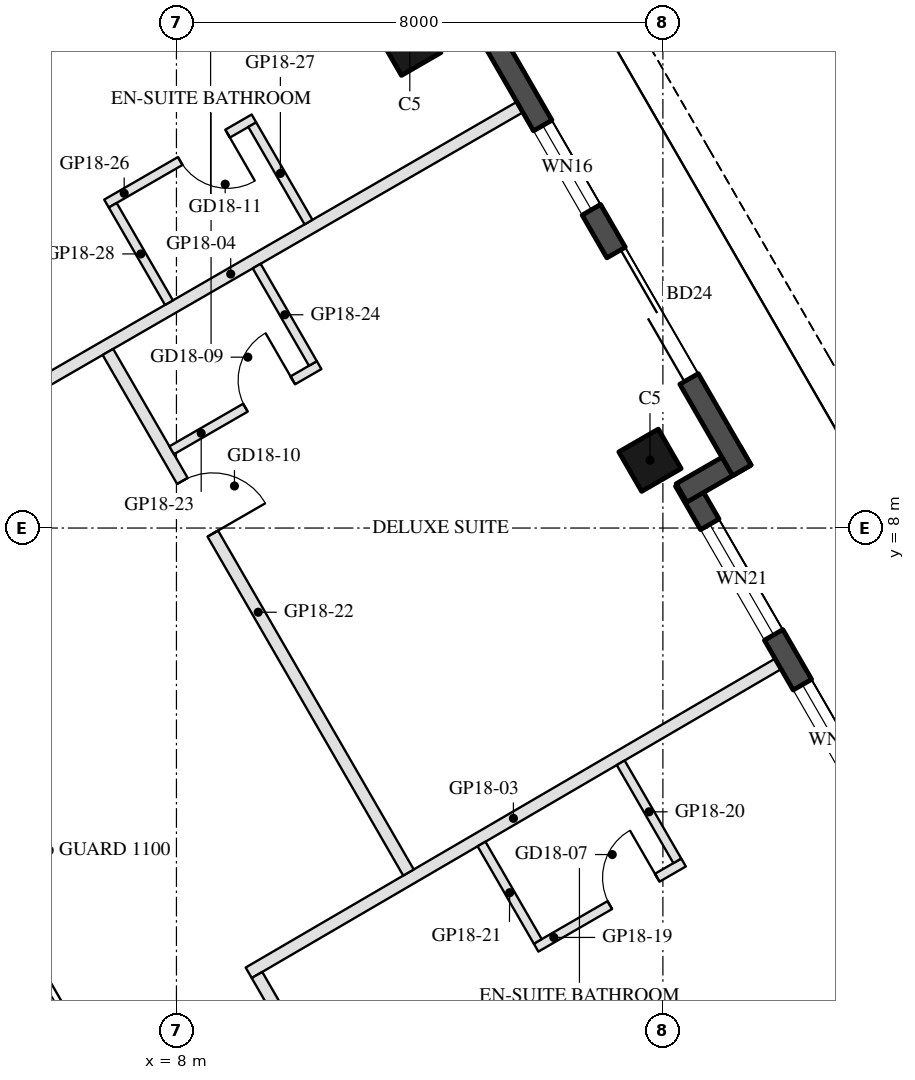
"""IFC4 building model, lengths in metres.
Left out: names, types, materials, properties, quantities, classifications, styles, units other than length and angle.
Written with IfcOpenShell. Run it as: python <this file> out.ifc"""

import sys

from ifc_helpers import new_model, si_unit, direction, frame, frame_2d, origin, origin_2d, place, context, subcontext, project, spatial, rectangle, hollow_rectangle, extrude, element, fill, save


model = new_model("IFC4")
c1 = context("Model", 3, precision=1e-05, world=origin(), true_north=direction((0.0, 1.0)))
c2 = subcontext(c1, "Body", "Model", "MODEL_VIEW")
j1 = project(units=[si_unit("LENGTHUNIT", "METRE"), si_unit("PLANEANGLEUNIT", "RADIAN")], contexts=[c1])
p1 = place(None, origin())
s1 = spatial("IfcSite", under=j1, at=p1, CompositionType="ELEMENT")
p2 = place(p1, origin())
s2 = spatial("IfcBuilding", under=s1, at=p2, CompositionType="ELEMENT")
p3 = place(p2, frame((0.0, 0.0, 198.4)))
s3 = spatial("IfcBuildingStorey", under=s2, at=p3, CompositionType="ELEMENT", Elevation=198.4)
for number, where, z_axis, x_axis in (
    (1, (15.788, 9.115, 0.0), (0.0, 0.0, 1.0), (-0.5, 0.866, 0.0)),
    (2, (11.838, 15.957, 0.0), (0.0, 0.0, 1.0), (-0.5, 0.866, 0.0)),
):
    element("IfcColumn", number, at=place(p3, frame(where, z_axis=z_axis, x_axis=x_axis)), inside=s3, PredefinedType="COLUMN", context=c2, shape_type="SweptSolid", body=[
        extrude(hollow_rectangle(XDim=0.75, YDim=0.75, WallThickness=0.035, at=origin_2d()), origin(), (0.0, 0.0, 1.0), 3.7),
    ])
p4 = place(p3, frame((19.729, 2.938, 0.0), z_axis=(0.0, 0.0, 1.0), x_axis=(-0.499976430342, 0.866039011305, 0.0)))
e3 = element("IfcWall", 3, at=p4, inside=s3, PredefinedType="SOLIDWALL", context=c2, shape_type="SweptSolid", body=[
    extrude(rectangle(XDim=6.74, YDim=0.35, at=frame_2d((3.37, 0.0))), origin(), (0.0, 0.0, 1.0), 3.55),
])
p5 = place(p4, frame((0.77, 0.0, 0.3)))
e4 = element("IfcOpeningElement", 4, at=p5, cuts=e3, PredefinedType="OPENING", context=c2, shape_type="SweptSolid", body=[
    extrude(rectangle(XDim=2.1, YDim=2.65, at=frame_2d((1.05, 1.325))), frame((0.0, 0.185, 0.0), z_axis=(0.0, -1.0, 0.0), x_axis=(1.0, 0.0, 0.0)), (0.0, 0.0, 1.0), 0.37),
])
p6 = place(p4, frame((3.815, 0.0, 0.3)))
e5 = element("IfcOpeningElement", 5, at=p6, cuts=e3, PredefinedType="OPENING", context=c2, shape_type="SweptSolid", body=[
    extrude(rectangle(XDim=2.1, YDim=2.65, at=frame_2d((1.05, 1.325))), frame((0.0, 0.185, 0.0), z_axis=(0.0, -1.0, 0.0), x_axis=(1.0, 0.0, 0.0)), (0.0, 0.0, 1.0), 0.37),
])
p7 = place(p3, frame((16.306, 8.577, 0.0), z_axis=(0.0, 0.0, 1.0), x_axis=(0.866092288191, 0.499884134912, 0.0)))
e6 = element("IfcWall", 6, at=p7, inside=s3, PredefinedType="SOLIDWALL", context=c2, shape_type="SweptSolid", body=[
    extrude(rectangle(XDim=1.22, YDim=0.35, at=frame_2d((0.61, 0.0))), origin(), (0.0, 0.0, 1.0), 3.55),
])
p8 = place(p3, frame((17.299, 8.948, 0.0), z_axis=(0.0, 0.0, 1.0), x_axis=(-0.500010041276, 0.866019606374, 0.0)))
e7 = element("IfcWall", 7, at=p8, inside=s3, PredefinedType="SOLIDWALL", context=c2, shape_type="SweptSolid", body=[
    extrude(rectangle(XDim=9.7, YDim=0.35, at=frame_2d((4.85, 0.0))), origin(), (0.0, 0.0, 1.0), 3.55),
])
p9 = place(p8, frame((1.737, 0.0, 0.0)))
e8 = element("IfcOpeningElement", 8, at=p9, cuts=e7, PredefinedType="OPENING", context=c2, shape_type="SweptSolid", body=[
    extrude(rectangle(XDim=2.4, YDim=2.4, at=frame_2d((1.2, 1.2))), frame((0.0, 0.185, 0.0), z_axis=(0.0, -1.0, 0.0), x_axis=(1.0, 0.0, 0.0)), (0.0, 0.0, 1.0), 0.37),
])
p10 = place(p8, frame((4.949, 0.0, 0.3)))
e9 = element("IfcOpeningElement", 9, at=p10, cuts=e7, PredefinedType="OPENING", context=c2, shape_type="SweptSolid", body=[
    extrude(rectangle(XDim=1.6, YDim=2.65, at=frame_2d((0.8, 1.325))), frame((0.0, 0.185, 0.0), z_axis=(0.0, -1.0, 0.0), x_axis=(1.0, 0.0, 0.0)), (0.0, 0.0, 1.0), 0.37),
])
p11 = place(p3, frame((17.895, 5.766, 0.0), z_axis=(0.0, 0.0, 1.0), x_axis=(-0.863697195261, -0.504011066246, 0.0)))
e10 = element("IfcWall", 10, at=p11, inside=s3, PredefinedType="PARTITIONING", context=c2, shape_type="SweptSolid", body=[
    extrude(rectangle(XDim=10.08, YDim=0.2, at=frame_2d((5.04, 0.0))), origin(), (0.0, 0.0, 1.0), 2.95),
])
p12 = place(p3, frame((13.647, 14.923, 0.0), z_axis=(0.0, 0.0, 1.0), x_axis=(-0.866027479907, -0.499996404033, 0.0)))
e11 = element("IfcWall", 11, at=p12, inside=s3, PredefinedType="PARTITIONING", context=c2, shape_type="SweptSolid", body=[
    extrude(rectangle(XDim=10.98, YDim=0.2, at=frame_2d((5.49, 0.0))), origin(), (0.0, 0.0, 1.0), 3.06),
])
p13 = place(p3, frame((9.325, 0.649, 0.0), z_axis=(0.0, 0.0, 1.0), x_axis=(0.500032331163, -0.866006736574, 0.0)))
e12 = element("IfcWall", 12, at=p13, inside=s3, PredefinedType="PARTITIONING", context=c2, shape_type="SweptSolid", body=[
    extrude(rectangle(XDim=5.888, YDim=0.2, at=frame_2d((2.944, 0.0))), origin(), (0.0, 0.0, 1.0), 2.95),
])
p14 = place(p13, frame((2.444, 0.0, 0.0)))
e13 = element("IfcOpeningElement", 13, at=p14, cuts=e12, PredefinedType="OPENING", context=c2, shape_type="SweptSolid", body=[
    extrude(rectangle(XDim=1.0, YDim=2.1, at=frame_2d((0.5, 1.05))), frame((0.0, 0.11, 0.0), z_axis=(0.0, -1.0, 0.0), x_axis=(1.0, 0.0, 0.0)), (0.0, 0.0, 1.0), 0.22),
])
p15 = place(p3, frame((13.915, 1.099, 0.0), z_axis=(0.0, 0.0, 1.0), x_axis=(0.866018616679, 0.500011755427, 0.0)))
e14 = element("IfcWall", 14, at=p15, inside=s3, PredefinedType="PARTITIONING", context=c2, shape_type="SweptSolid", body=[
    extrude(rectangle(XDim=2.8, YDim=0.15, at=frame_2d((1.4, 0.0))), origin(), (0.0, 0.0, 1.0), 3.55),
])
p16 = place(p15, frame((1.4, 0.0, 0.0)))
e15 = element("IfcOpeningElement", 15, at=p16, cuts=e14, PredefinedType="OPENING", context=c2, shape_type="SweptSolid", body=[
    extrude(rectangle(XDim=0.9, YDim=2.1, at=frame_2d((0.45, 1.05))), frame((0.0, 0.085, 0.0), z_axis=(0.0, -1.0, 0.0), x_axis=(1.0, 0.0, 0.0)), (0.0, 0.0, 1.0), 0.17),
])
p17 = place(p3, frame((16.237, 2.526, 0.0), z_axis=(0.0, 0.0, 1.0), x_axis=(-0.500043919151, 0.866000045566, 0.0)))
e16 = element("IfcWall", 16, at=p17, inside=s3, PredefinedType="PARTITIONING", context=c2, shape_type="SweptSolid", body=[
    extrude(rectangle(XDim=1.863, YDim=0.15, at=frame_2d((0.931, 0.0))), origin(), (0.0, 0.0, 1.0), 3.55),
])
p18 = place(p3, frame((13.942, 1.201, 0.0), z_axis=(0.0, 0.0, 1.0), x_axis=(-0.500026996568, 0.866009816748, 0.0)))
e17 = element("IfcWall", 17, at=p18, inside=s3, PredefinedType="PARTITIONING", context=c2, shape_type="SweptSolid", body=[
    extrude(rectangle(XDim=1.851, YDim=0.15, at=frame_2d((0.925, 0.0))), origin(), (0.0, 0.0, 1.0), 3.55),
])
p19 = place(p3, frame((6.873, 10.896, 0.0), z_axis=(0.0, 0.0, 1.0), x_axis=(0.499987518031, -0.866032610133, 0.0)))
e18 = element("IfcWall", 18, at=p19, inside=s3, PredefinedType="PARTITIONING", context=c2, shape_type="SweptSolid", body=[
    extrude(rectangle(XDim=9.886, YDim=0.2, at=frame_2d((4.943, 0.0))), origin(), (0.0, 0.0, 1.0), 2.95),
])
p20 = place(p19, frame((2.45, 0.0, 0.0)))
e19 = element("IfcOpeningElement", 19, at=p20, cuts=e18, PredefinedType="OPENING", context=c2, shape_type="SweptSolid", body=[
    extrude(rectangle(XDim=1.0, YDim=2.1, at=frame_2d((0.5, 1.05))), frame((0.0, 0.11, 0.0), z_axis=(0.0, -1.0, 0.0), x_axis=(1.0, 0.0, 0.0)), (0.0, 0.0, 1.0), 0.22),
])
p21 = place(p3, frame((7.922, 9.279, 0.0), z_axis=(0.0, 0.0, 1.0), x_axis=(0.865996816683, 0.500049511043, 0.0)))
e20 = element("IfcWall", 20, at=p21, inside=s3, PredefinedType="PARTITIONING", context=c2, shape_type="SweptSolid", body=[
    extrude(rectangle(XDim=2.8, YDim=0.15, at=frame_2d((1.4, 0.0))), origin(), (0.0, 0.0, 1.0), 2.95),
])
p22 = place(p21, frame((1.4, 0.0, 0.0)))
e21 = element("IfcOpeningElement", 21, at=p22, cuts=e20, PredefinedType="OPENING", context=c2, shape_type="SweptSolid", body=[
    extrude(rectangle(XDim=0.9, YDim=2.1, at=frame_2d((0.45, 1.05))), frame((0.0, 0.085, 0.0), z_axis=(0.0, -1.0, 0.0), x_axis=(1.0, 0.0, 0.0)), (0.0, 0.0, 1.0), 0.17),
])
p23 = place(p3, frame((10.244, 10.707, 0.0), z_axis=(0.0, 0.0, 1.0), x_axis=(-0.500042316284, 0.866000971088, 0.0)))
e22 = element("IfcWall", 22, at=p23, inside=s3, PredefinedType="PARTITIONING", context=c2, shape_type="SweptSolid", body=[
    extrude(rectangle(XDim=1.85, YDim=0.15, at=frame_2d((0.925, 0.0))), origin(), (0.0, 0.0, 1.0), 3.55),
])
p24 = place(p3, frame((9.274, 14.737, 0.0), z_axis=(0.0, 0.0, 1.0), x_axis=(-0.866018616679, -0.500011755427, 0.0)))
e23 = element("IfcWall", 23, at=p24, inside=s3, PredefinedType="PARTITIONING", context=c2, shape_type="SweptSolid", body=[
    extrude(rectangle(XDim=2.8, YDim=0.15, at=frame_2d((1.4, 0.0))), origin(), (0.0, 0.0, 1.0), 3.55),
])
p25 = place(p24, frame((0.5, 0.0, 0.0)))
e24 = element("IfcOpeningElement", 24, at=p25, cuts=e23, PredefinedType="OPENING", context=c2, shape_type="SweptSolid", body=[
    extrude(rectangle(XDim=0.9, YDim=2.1, at=frame_2d((0.45, 1.05))), frame((0.0, 0.085, 0.0), z_axis=(0.0, -1.0, 0.0), x_axis=(1.0, 0.0, 0.0)), (0.0, 0.0, 1.0), 0.17),
])
p26 = place(p3, frame((10.172, 13.032, 0.0), z_axis=(0.0, 0.0, 1.0), x_axis=(-0.500042316284, 0.866000971088, 0.0)))
e25 = element("IfcWall", 25, at=p26, inside=s3, PredefinedType="PARTITIONING", context=c2, shape_type="SweptSolid", body=[
    extrude(rectangle(XDim=1.85, YDim=0.15, at=frame_2d((0.925, 0.0))), origin(), (0.0, 0.0, 1.0), 2.95),
])
p27 = place(p3, frame((7.877, 11.707, 0.0), z_axis=(0.0, 0.0, 1.0), x_axis=(-0.499985172903, 0.866033964044, 0.0)))
e26 = element("IfcWall", 26, at=p27, inside=s3, PredefinedType="PARTITIONING", context=c2, shape_type="SweptSolid", body=[
    extrude(rectangle(XDim=1.85, YDim=0.15, at=frame_2d((0.925, 0.0))), origin(), (0.0, 0.0, 1.0), 2.95),
])
p28 = place(p5, origin())
e27 = element("IfcWindow", 27, at=p28, inside=s3, PartitioningType="SINGLE_PANEL", PredefinedType="WINDOW", context=c2, shape_type="SweptSolid", body=[
    extrude(rectangle(XDim=2.1, YDim=2.65, at=frame_2d((1.05, 1.325))), frame((0.0, 0.03, 0.0), z_axis=(0.0, -1.0, 0.0), x_axis=(1.0, 0.0, 0.0)), (0.0, 0.0, 1.0), 0.06),
])
fill(e4, e27)
p29 = place(p6, origin())
e28 = element("IfcWindow", 28, at=p29, inside=s3, PartitioningType="SINGLE_PANEL", PredefinedType="WINDOW", context=c2, shape_type="SweptSolid", body=[
    extrude(rectangle(XDim=2.1, YDim=2.65, at=frame_2d((1.05, 1.325))), frame((0.0, 0.03, 0.0), z_axis=(0.0, -1.0, 0.0), x_axis=(1.0, 0.0, 0.0)), (0.0, 0.0, 1.0), 0.06),
])
fill(e5, e28)
p30 = place(p9, frame((2.4, 0.0, 0.0), z_axis=(0.0, 0.0, 1.0), x_axis=(-1.0, 0.0, 0.0)))
e29 = element("IfcDoor", 29, at=p30, inside=s3, OperationType="SLIDING_TO_LEFT", PredefinedType="DOOR", context=c2, shape_type="SweptSolid", body=[
    extrude(rectangle(XDim=2.4, YDim=2.4, at=frame_2d((1.2, 1.2))), frame((0.0, 0.025, 0.0), z_axis=(0.0, -1.0, 0.0), x_axis=(1.0, 0.0, 0.0)), (0.0, 0.0, 1.0), 0.05),
])
fill(e8, e29)
p31 = place(p10, origin())
e30 = element("IfcWindow", 30, at=p31, inside=s3, PartitioningType="SINGLE_PANEL", PredefinedType="WINDOW", context=c2, shape_type="SweptSolid", body=[
    extrude(rectangle(XDim=1.6, YDim=2.65, at=frame_2d((0.8, 1.325))), frame((0.0, 0.03, 0.0), z_axis=(0.0, -1.0, 0.0), x_axis=(1.0, 0.0, 0.0)), (0.0, 0.0, 1.0), 0.06),
])
fill(e9, e30)
p32 = place(p16, origin())
e31 = element("IfcDoor", 31, at=p32, inside=s3, OperationType="SINGLE_SWING_RIGHT", PredefinedType="DOOR", context=c2, shape_type="SweptSolid", body=[
    extrude(rectangle(XDim=0.9, YDim=2.1, at=frame_2d((0.45, 1.05))), frame((0.0, 0.025, 0.0), z_axis=(0.0, -1.0, 0.0), x_axis=(1.0, 0.0, 0.0)), (0.0, 0.0, 1.0), 0.05),
])
fill(e15, e31)
p33 = place(p22, origin())
e32 = element("IfcDoor", 32, at=p33, inside=s3, OperationType="SINGLE_SWING_RIGHT", PredefinedType="DOOR", context=c2, shape_type="SweptSolid", body=[
    extrude(rectangle(XDim=0.9, YDim=2.1, at=frame_2d((0.45, 1.05))), frame((0.0, 0.025, 0.0), z_axis=(0.0, -1.0, 0.0), x_axis=(1.0, 0.0, 0.0)), (0.0, 0.0, 1.0), 0.05),
])
fill(e21, e32)
p34 = place(p20, origin())
e33 = element("IfcDoor", 33, at=p34, inside=s3, OperationType="SINGLE_SWING_RIGHT", PredefinedType="DOOR", context=c2, shape_type="SweptSolid", body=[
    extrude(rectangle(XDim=1.0, YDim=2.1, at=frame_2d((0.5, 1.05))), frame((0.0, 0.025, 0.0), z_axis=(0.0, -1.0, 0.0), x_axis=(1.0, 0.0, 0.0)), (0.0, 0.0, 1.0), 0.05),
])
fill(e19, e33)
p35 = place(p25, origin())
e34 = element("IfcDoor", 34, at=p35, inside=s3, OperationType="SINGLE_SWING_LEFT", PredefinedType="DOOR", context=c2, shape_type="SweptSolid", body=[
    extrude(rectangle(XDim=0.9, YDim=2.1, at=frame_2d((0.45, 1.05))), frame((0.0, 0.025, 0.0), z_axis=(0.0, -1.0, 0.0), x_axis=(1.0, 0.0, 0.0)), (0.0, 0.0, 1.0), 0.05),
])
fill(e24, e34)
save(model, sys.argv[1])
